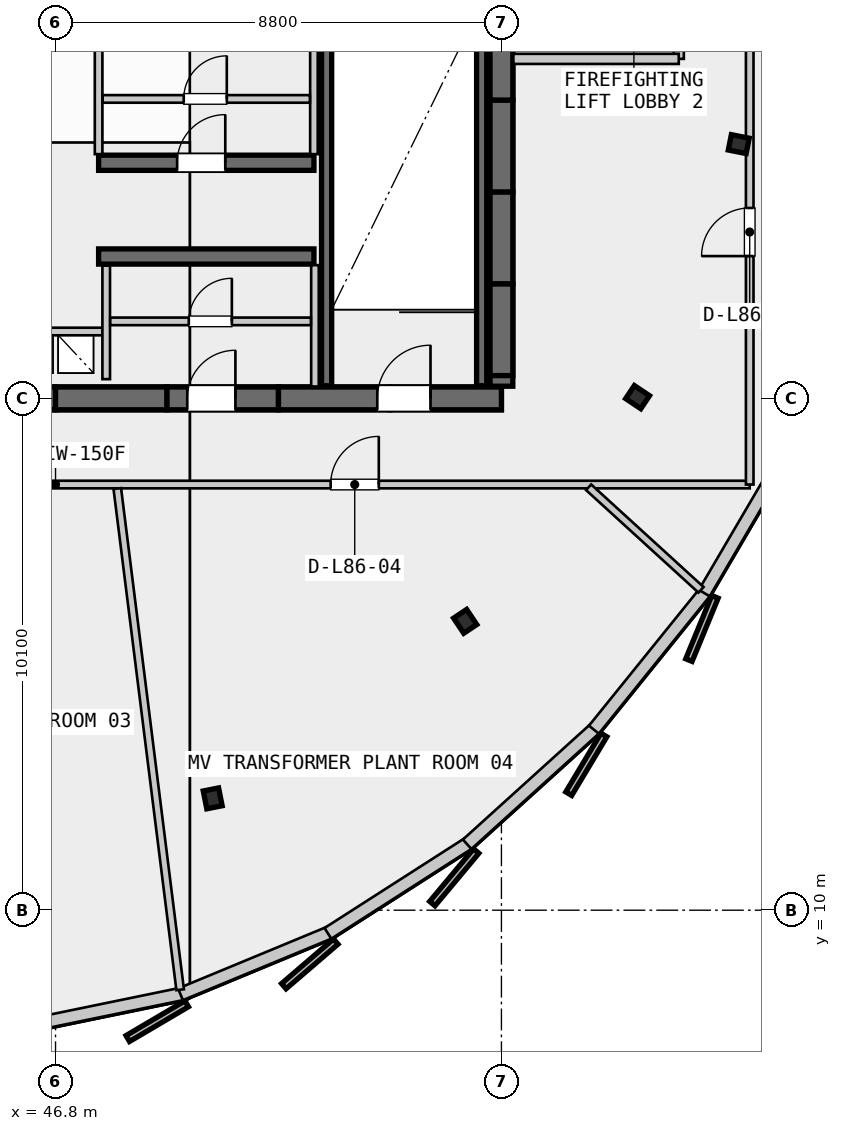
"""IFC4 building model, lengths in metres.
Left out: names, types, materials, properties, quantities, classifications, styles, units other than length and angle.
Written with IfcOpenShell. Run it as: python <this file> out.ifc"""

import sys

from ifc_helpers import new_model, si_unit, direction, frame, frame_2d, origin, origin_2d, place, context, subcontext, project, spatial, rectangle, i_section, extrude, source, transform, mapped, element, fill, save


model = new_model("IFC4")
c1 = context("Model", 3, precision=1e-05, world=origin(), true_north=direction((0.0, 1.0)))
c2 = subcontext(c1, "Body", "Model", "MODEL_VIEW")
j1 = project(units=[si_unit("LENGTHUNIT", "METRE"), si_unit("PLANEANGLEUNIT", "RADIAN")], contexts=[c1])
p1 = place(None, origin())
s1 = spatial("IfcSite", under=j1, at=p1, CompositionType="ELEMENT")
p2 = place(p1, origin())
s2 = spatial("IfcBuilding", under=s1, at=p2, CompositionType="ELEMENT")
p3 = place(p2, frame((0.0, 0.0, 324.3)))
s3 = spatial("IfcBuildingStorey", under=s2, at=p3, CompositionType="ELEMENT", Elevation=324.3)
p4 = place(p3, frame((38.0, 20.1, 0.0), z_axis=(0.0, 0.0, 1.0), x_axis=(1.0, 0.0, 0.0)))
e1 = element("IfcWall", 1, at=p4, inside=s3, PredefinedType="SHEAR", context=c2, shape_type="SweptSolid", body=[
    extrude(rectangle(XDim=17.6, YDim=0.45, at=frame_2d((8.8, 0.0))), origin(), (0.0, 0.0, 1.0), 4.2),
])
p5 = place(p4, frame((1.4, 0.0, 0.0)))
e2 = element("IfcOpeningElement", 2, at=p5, cuts=e1, PredefinedType="OPENING", context=c2, shape_type="SweptSolid", body=[
    extrude(rectangle(XDim=1.05, YDim=2.15, at=frame_2d((0.525, 1.075))), frame((0.0, 0.235, 0.0), z_axis=(0.0, -1.0, 0.0), x_axis=(1.0, 0.0, 0.0)), (0.0, 0.0, 1.0), 0.47),
])
p6 = place(p4, frame((15.15, 0.0, 0.0)))
e3 = element("IfcOpeningElement", 3, at=p6, cuts=e1, PredefinedType="OPENING", context=c2, shape_type="SweptSolid", body=[
    extrude(rectangle(XDim=1.05, YDim=2.15, at=frame_2d((0.525, 1.075))), frame((0.0, 0.235, 0.0), z_axis=(0.0, -1.0, 0.0), x_axis=(1.0, 0.0, 0.0)), (0.0, 0.0, 1.0), 0.47),
])
p7 = place(p4, frame((5.25, 0.0, 0.0)))
e4 = element("IfcOpeningElement", 4, at=p7, cuts=e1, PredefinedType="OPENING", context=c2, shape_type="SweptSolid", body=[
    extrude(rectangle(XDim=0.9, YDim=2.15, at=frame_2d((0.45, 1.075))), frame((0.0, 0.235, 0.0), z_axis=(0.0, -1.0, 0.0), x_axis=(1.0, 0.0, 0.0)), (0.0, 0.0, 1.0), 0.47),
])
p8 = place(p4, frame((11.4, 0.0, 0.0)))
e5 = element("IfcOpeningElement", 5, at=p8, cuts=e1, PredefinedType="OPENING", context=c2, shape_type="SweptSolid", body=[
    extrude(rectangle(XDim=0.95, YDim=2.15, at=frame_2d((0.475, 1.075))), frame((0.0, 0.235, 0.0), z_axis=(0.0, -1.0, 0.0), x_axis=(1.0, 0.0, 0.0)), (0.0, 0.0, 1.0), 0.47),
])
p9 = place(p3, frame((55.6, 20.34, 0.0), z_axis=(0.0, 0.0, 1.0), x_axis=(0.0, 1.0, 0.0)))
e6 = element("IfcWall", 6, at=p9, inside=s3, PredefinedType="SHEAR", context=c2, shape_type="SweptSolid", body=[
    extrude(rectangle(XDim=14.92, YDim=0.45, at=frame_2d((7.46, 0.0))), origin(), (0.0, 0.0, 1.0), 4.2),
])
p10 = place(p9, frame((12.71, 0.0, 0.0)))
e7 = element("IfcOpeningElement", 7, at=p10, cuts=e6, PredefinedType="OPENING", context=c2, shape_type="SweptSolid", body=[
    extrude(rectangle(XDim=1.05, YDim=2.15, at=frame_2d((0.525, 1.075))), frame((0.0, 0.235, 0.0), z_axis=(0.0, -1.0, 0.0), x_axis=(1.0, 0.0, 0.0)), (0.0, 0.0, 1.0), 0.47),
])
p11 = place(p9, frame((8.61, 0.0, 0.0)))
e8 = element("IfcOpeningElement", 8, at=p11, cuts=e6, PredefinedType="OPENING", context=c2, shape_type="SweptSolid", body=[
    extrude(rectangle(XDim=1.1, YDim=2.2, at=frame_2d((0.55, 1.1))), frame((0.0, 0.235, 0.0), z_axis=(0.0, -1.0, 0.0), x_axis=(1.0, 0.0, 0.0)), (0.0, 0.0, 1.0), 0.47),
])
p12 = place(p3, frame((47.65, 22.9, 0.0), z_axis=(0.0, 0.0, 1.0), x_axis=(1.0, 0.0, 0.0)))
e9 = element("IfcWall", 9, at=p12, inside=s3, PredefinedType="SHEAR", context=c2, shape_type="SweptSolid", body=[
    extrude(rectangle(XDim=4.25, YDim=0.3, at=frame_2d((2.125, 0.0))), origin(), (0.0, 0.0, 1.0), 4.2),
])
p13 = place(p3, frame((47.65, 24.75, 0.0), z_axis=(0.0, 0.0, 1.0), x_axis=(1.0, 0.0, 0.0)))
e10 = element("IfcWall", 10, at=p13, inside=s3, PredefinedType="SHEAR", context=c2, shape_type="SweptSolid", body=[
    extrude(rectangle(XDim=4.25, YDim=0.3, at=frame_2d((2.125, 0.0))), origin(), (0.0, 0.0, 1.0), 4.2),
])
p14 = place(p13, frame((1.55, 0.0, 0.0)))
e11 = element("IfcOpeningElement", 11, at=p14, cuts=e10, PredefinedType="OPENING", context=c2, shape_type="SweptSolid", body=[
    extrude(rectangle(XDim=0.95, YDim=2.15, at=frame_2d((0.475, 1.075))), frame((0.0, 0.16, 0.0), z_axis=(0.0, -1.0, 0.0), x_axis=(1.0, 0.0, 0.0)), (0.0, 0.0, 1.0), 0.32),
])
m1 = source(origin(), c2, "Body", "SweptSolid", [
    extrude(i_section(OverallWidth=0.309, OverallDepth=0.359, WebThickness=0.016, FlangeThickness=0.026, FilletRadius=0.027, at=origin_2d()), origin(), (0.0, 0.0, 1.0), 5.234),
])
p15 = place(p3, frame((49.902, 12.207, 0.0), z_axis=(0.0, 0.0, 1.0), x_axis=(0.195090322016, -0.980785280403, 0.0)))
e12 = element("IfcColumn", 12, at=p15, inside=s3, PredefinedType="COLUMN", context=c2, shape_type="MappedRepresentation", body=[
    mapped(m1, transform((0.0, 0.0, 0.0), scale=1.0)),
])
m2 = source(origin(), c2, "Body", "SweptSolid", [
    extrude(i_section(OverallWidth=0.309, OverallDepth=0.359, WebThickness=0.016, FlangeThickness=0.026, FilletRadius=0.027, at=origin_2d()), origin(), (0.0, 0.0, 1.0), 6.133),
])
p16 = place(p3, frame((54.885, 15.7, 0.0), z_axis=(0.0, 0.0, 1.0), x_axis=(0.55557023302, -0.831469612303, 0.0)))
e13 = element("IfcColumn", 13, at=p16, inside=s3, PredefinedType="COLUMN", context=c2, shape_type="MappedRepresentation", body=[
    mapped(m2, transform((0.0, 0.0, 0.0), scale=1.0)),
])
m3 = source(origin(), c2, "Body", "SweptSolid", [
    extrude(i_section(OverallWidth=0.309, OverallDepth=0.359, WebThickness=0.016, FlangeThickness=0.026, FilletRadius=0.027, at=origin_2d()), origin(), (0.0, 0.0, 1.0), 7.106),
])
p17 = place(p3, frame((58.287, 20.125, 0.0), z_axis=(0.0, 0.0, 1.0), x_axis=(0.831469612303, -0.55557023302, 0.0)))
e14 = element("IfcColumn", 14, at=p17, inside=s3, PredefinedType="COLUMN", context=c2, shape_type="MappedRepresentation", body=[
    mapped(m3, transform((0.0, 0.0, 0.0), scale=1.0)),
])
m4 = source(origin(), c2, "Body", "SweptSolid", [
    extrude(i_section(OverallWidth=0.309, OverallDepth=0.359, WebThickness=0.016, FlangeThickness=0.026, FilletRadius=0.027, at=origin_2d()), origin(), (0.0, 0.0, 1.0), 8.099),
])
p18 = place(p3, frame((60.284, 25.118, 0.0), z_axis=(0.0, 0.0, 1.0), x_axis=(0.980785280403, -0.195090322016, 0.0)))
e15 = element("IfcColumn", 15, at=p18, inside=s3, PredefinedType="COLUMN", context=c2, shape_type="MappedRepresentation", body=[
    mapped(m4, transform((0.0, 0.0, 0.0), scale=1.0)),
])
p19 = place(p3, frame((44.6, 20.1, 4.2), z_axis=(0.0, 0.0, 1.0), x_axis=(1.0, 0.0, 0.0)))
e16 = element("IfcWall", 16, at=p19, inside=s3, PredefinedType="SHEAR", context=c2, shape_type="SweptSolid", body=[
    extrude(rectangle(XDim=2.2, YDim=0.45, at=frame_2d((1.1, 0.0))), origin(), (0.0, 0.0, 1.0), 2.129),
])
p20 = place(p3, frame((46.8, 20.1, 4.2), z_axis=(0.0, 0.0, 1.0), x_axis=(1.0, 0.0, 0.0)))
e17 = element("IfcWall", 17, at=p20, inside=s3, PredefinedType="SHEAR", context=c2, shape_type="SweptSolid", body=[
    extrude(rectangle(XDim=2.2, YDim=0.45, at=frame_2d((1.1, 0.0))), origin(), (0.0, 0.0, 1.0), 2.255),
])
p21 = place(p3, frame((49.0, 20.1, 4.2), z_axis=(0.0, 0.0, 1.0), x_axis=(1.0, 0.0, 0.0)))
e18 = element("IfcWall", 18, at=p21, inside=s3, PredefinedType="SHEAR", context=c2, shape_type="SweptSolid", body=[
    extrude(rectangle(XDim=2.2, YDim=0.45, at=frame_2d((1.1, 0.0))), origin(), (0.0, 0.0, 1.0), 2.381),
])
p22 = place(p3, frame((51.2, 20.1, 4.2), z_axis=(0.0, 0.0, 1.0), x_axis=(1.0, 0.0, 0.0)))
e19 = element("IfcWall", 19, at=p22, inside=s3, PredefinedType="SHEAR", context=c2, shape_type="SweptSolid", body=[
    extrude(rectangle(XDim=2.2, YDim=0.45, at=frame_2d((1.1, 0.0))), origin(), (0.0, 0.0, 1.0), 2.507),
])
p23 = place(p3, frame((53.4, 20.1, 4.2), z_axis=(0.0, 0.0, 1.0), x_axis=(1.0, 0.0, 0.0)))
e20 = element("IfcWall", 20, at=p23, inside=s3, PredefinedType="SHEAR", context=c2, shape_type="SweptSolid", body=[
    extrude(rectangle(XDim=2.2, YDim=0.45, at=frame_2d((1.1, 0.0))), origin(), (0.0, 0.0, 1.0), 2.633),
])
p24 = place(p3, frame((55.6, 20.55, 4.2), z_axis=(0.0, 0.0, 1.0), x_axis=(0.0, 1.0, 0.0)))
e21 = element("IfcWall", 21, at=p24, inside=s3, PredefinedType="SHEAR", context=c2, shape_type="SweptSolid", body=[
    extrude(rectangle(XDim=1.812, YDim=0.45, at=frame_2d((0.906, 0.0))), origin(), (0.0, 0.0, 1.0), 2.837),
])
p25 = place(p3, frame((55.6, 22.363, 4.2), z_axis=(0.0, 0.0, 1.0), x_axis=(0.0, 1.0, 0.0)))
e22 = element("IfcWall", 22, at=p25, inside=s3, PredefinedType="SHEAR", context=c2, shape_type="SweptSolid", body=[
    extrude(rectangle(XDim=1.812, YDim=0.45, at=frame_2d((0.906, 0.0))), origin(), (0.0, 0.0, 1.0), 3.156),
])
p26 = place(p3, frame((55.6, 24.175, 4.2), z_axis=(0.0, 0.0, 1.0), x_axis=(0.0, 1.0, 0.0)))
e23 = element("IfcWall", 23, at=p26, inside=s3, PredefinedType="SHEAR", context=c2, shape_type="SweptSolid", body=[
    extrude(rectangle(XDim=1.812, YDim=0.45, at=frame_2d((0.906, 0.0))), origin(), (0.0, 0.0, 1.0), 3.475),
])
p27 = place(p3, frame((55.6, 25.988, 4.2), z_axis=(0.0, 0.0, 1.0), x_axis=(0.0, 1.0, 0.0)))
e24 = element("IfcWall", 24, at=p27, inside=s3, PredefinedType="SHEAR", context=c2, shape_type="SweptSolid", body=[
    extrude(rectangle(XDim=1.812, YDim=0.45, at=frame_2d((0.906, 0.0))), origin(), (0.0, 0.0, 1.0), 3.794),
])
p28 = place(p3, frame((46.283, 7.728, 4.226), z_axis=(0.0, 0.0, 1.0), x_axis=(0.979455196184, 0.201661891959, 0.0)))
e25 = element("IfcWall", 25, at=p28, inside=s3, PredefinedType="PARAPET", context=c2, shape_type="SweptSolid", body=[
    extrude(rectangle(XDim=3.071, YDim=0.25, at=frame_2d((1.536, 0.0))), origin(), (0.0, 0.0, 1.0), 0.16),
])
p29 = place(p3, frame((49.266, 8.34, 4.507), z_axis=(0.0, 0.0, 1.0), x_axis=(0.923860238218, 0.382730009588, 0.0)))
e26 = element("IfcWall", 26, at=p29, inside=s3, PredefinedType="PARAPET", context=c2, shape_type="SweptSolid", body=[
    extrude(rectangle(XDim=3.174, YDim=0.25, at=frame_2d((1.587, 0.0))), origin(), (0.0, 0.0, 1.0), 0.21),
])
p30 = place(p3, frame((52.176, 9.543, 4.889), z_axis=(0.0, 0.0, 1.0), x_axis=(0.841940597413, 0.539570227521, 0.0)))
e27 = element("IfcWall", 27, at=p30, inside=s3, PredefinedType="PARAPET", context=c2, shape_type="SweptSolid", body=[
    extrude(rectangle(XDim=3.285, YDim=0.25, at=frame_2d((1.643, 0.0))), origin(), (0.0, 0.0, 1.0), 0.255),
])
p31 = place(p3, frame((54.923, 11.302, 5.359), z_axis=(0.0, 0.0, 1.0), x_axis=(0.741510215503, 0.670941577415, 0.0)))
e28 = element("IfcWall", 28, at=p31, inside=s3, PredefinedType="PARAPET", context=c2, shape_type="SweptSolid", body=[
    extrude(rectangle(XDim=3.394, YDim=0.25, at=frame_2d((1.697, 0.0))), origin(), (0.0, 0.0, 1.0), 0.292),
])
p32 = place(p3, frame((57.425, 13.563, 5.903), z_axis=(0.0, 0.0, 1.0), x_axis=(0.628232778482, 0.778025434058, 0.0)))
e29 = element("IfcWall", 29, at=p32, inside=s3, PredefinedType="PARAPET", context=c2, shape_type="SweptSolid", body=[
    extrude(rectangle(XDim=3.486, YDim=0.25, at=frame_2d((1.743, 0.0))), origin(), (0.0, 0.0, 1.0), 0.321),
])
p33 = place(p3, frame((59.603, 16.258, 6.506), z_axis=(0.0, 0.0, 1.0), x_axis=(0.505932830003, 0.862572878964, 0.0)))
e30 = element("IfcWall", 30, at=p33, inside=s3, PredefinedType="PARAPET", context=c2, shape_type="SweptSolid", body=[
    extrude(rectangle(XDim=3.553, YDim=0.25, at=frame_2d((1.777, 0.0))), origin(), (0.0, 0.0, 1.0), 0.341),
])
for number, where, z_axis, x_axis in (
    (31, (55.21, 27.7, 0.0), (0.0, 0.0, 1.0), (0.0, -1.0, 0.0)),
    (32, (52.15, 20.35, 0.0), (0.0, 0.0, 1.0), (0.0, 1.0, 0.0)),
):
    element("IfcWall", number, at=place(p3, frame(where, z_axis=z_axis, x_axis=x_axis)), inside=s3, PredefinedType="SHEAR", context=c2, shape_type="SweptSolid", body=[
        extrude(rectangle(XDim=7.35, YDim=0.2, at=frame_2d((3.675, 0.0))), origin(), (0.0, 0.0, 1.0), 4.2),
    ])
p34 = place(p3, frame((45.8, 21.42, 0.0), z_axis=(0.0, 0.0, 1.0), x_axis=(1.0, 0.0, 0.0)))
e33 = element("IfcWall", 33, at=p34, inside=s3, PredefinedType="PARTITIONING", context=c2, shape_type="SweptSolid", body=[
    extrude(rectangle(XDim=2.0, YDim=0.15, at=frame_2d((1.0, 0.0))), origin(), (0.0, 0.0, 1.0), 3.49),
])
p35 = place(p3, frame((47.8, 20.48, 0.0), z_axis=(0.0, 0.0, 1.0), x_axis=(0.0, 1.0, 0.0)))
e34 = element("IfcWall", 34, at=p35, inside=s3, PredefinedType="PARTITIONING", context=c2, shape_type="SweptSolid", body=[
    extrude(rectangle(XDim=2.24, YDim=0.15, at=frame_2d((1.12, 0.0))), origin(), (0.0, 0.0, 1.0), 3.49),
])
p36 = place(p3, frame((59.1, 26.8, 0.0), z_axis=(0.0, 0.0, 1.0), x_axis=(0.0, 1.0, 0.0)))
e35 = element("IfcWall", 35, at=p36, inside=s3, PredefinedType="PARTITIONING", context=c2, shape_type="SweptSolid", body=[
    extrude(rectangle(XDim=4.4, YDim=0.2, at=frame_2d((2.2, 0.0))), origin(), (0.0, 0.0, 1.0), 3.49),
])
p37 = place(p36, frame((1.65, 0.0, 0.0)))
e36 = element("IfcOpeningElement", 36, at=p37, cuts=e35, PredefinedType="OPENING", context=c2, shape_type="SweptSolid", body=[
    extrude(rectangle(XDim=1.05, YDim=2.15, at=frame_2d((0.525, 1.075))), frame((0.0, 0.11, 0.0), z_axis=(0.0, -1.0, 0.0), x_axis=(1.0, 0.0, 0.0)), (0.0, 0.0, 1.0), 0.22),
])
p38 = place(p3, frame((55.835, 26.8, 0.0), z_axis=(0.0, 0.0, 1.0), x_axis=(1.0, 0.0, 0.0)))
e37 = element("IfcWall", 37, at=p38, inside=s3, PredefinedType="PARTITIONING", context=c2, shape_type="SweptSolid", body=[
    extrude(rectangle(XDim=3.265, YDim=0.2, at=frame_2d((1.633, 0.0))), origin(), (0.0, 0.0, 1.0), 3.49),
])
p39 = place(p3, frame((51.92, 20.335, 0.0), z_axis=(0.0, 0.0, 1.0), x_axis=(0.0, 1.0, 0.0)))
e38 = element("IfcWall", 38, at=p39, inside=s3, PredefinedType="PARTITIONING", context=c2, shape_type="SweptSolid", body=[
    extrude(rectangle(XDim=2.395, YDim=0.15, at=frame_2d((1.198, 0.0))), origin(), (0.0, 0.0, 1.0), 3.49),
])
p40 = place(p3, frame((47.88, 21.62, 0.0), z_axis=(0.0, 0.0, 1.0), x_axis=(1.0, 0.0, 0.0)))
e39 = element("IfcWall", 39, at=p40, inside=s3, PredefinedType="PARTITIONING", context=c2, shape_type="SweptSolid", body=[
    extrude(rectangle(XDim=3.96, YDim=0.15, at=frame_2d((1.98, 0.0))), origin(), (0.0, 0.0, 1.0), 2.76),
])
p41 = place(p40, frame((1.55, 0.0, 0.0)))
e40 = element("IfcOpeningElement", 40, at=p41, cuts=e39, PredefinedType="OPENING", context=c2, shape_type="SweptSolid", body=[
    extrude(rectangle(XDim=0.85, YDim=2.15, at=frame_2d((0.425, 1.075))), frame((0.0, 0.085, 0.0), z_axis=(0.0, -1.0, 0.0), x_axis=(1.0, 0.0, 0.0)), (0.0, 0.0, 1.0), 0.17),
])
for number, where, z_axis, x_axis in (
    (41, (47.65, 24.92, 0.0), (0.0, 0.0, 1.0), (0.0, 1.0, 0.0)),
    (42, (51.9, 24.92, 0.0), (0.0, 0.0, 1.0), (0.0, 1.0, 0.0)),
):
    element("IfcWall", number, at=place(p3, frame(where, z_axis=z_axis, x_axis=x_axis)), inside=s3, PredefinedType="PARTITIONING", context=c2, shape_type="SweptSolid", body=[
        extrude(rectangle(XDim=2.24, YDim=0.15, at=frame_2d((1.12, 0.0))), origin(), (0.0, 0.0, 1.0), 2.76),
    ])
p42 = place(p3, frame((47.73, 26.01, 0.0), z_axis=(0.0, 0.0, 1.0), x_axis=(1.0, 0.0, 0.0)))
e43 = element("IfcWall", 43, at=p42, inside=s3, PredefinedType="PARTITIONING", context=c2, shape_type="SweptSolid", body=[
    extrude(rectangle(XDim=4.09, YDim=0.15, at=frame_2d((2.045, 0.0))), origin(), (0.0, 0.0, 1.0), 2.76),
])
p43 = place(p42, frame((1.6, 0.0, 0.0)))
e44 = element("IfcOpeningElement", 44, at=p43, cuts=e43, PredefinedType="OPENING", context=c2, shape_type="SweptSolid", body=[
    extrude(rectangle(XDim=0.85, YDim=2.15, at=frame_2d((0.425, 1.075))), frame((0.0, 0.085, 0.0), z_axis=(0.0, -1.0, 0.0), x_axis=(1.0, 0.0, 0.0)), (0.0, 0.0, 1.0), 0.17),
])
p44 = place(p3, frame((33.1, 18.4, 0.0), z_axis=(0.0, 0.0, 1.0), x_axis=(1.0, 0.0, 0.0)))
e45 = element("IfcWall", 45, at=p44, inside=s3, PredefinedType="PARTITIONING", context=c2, shape_type="SweptSolid", body=[
    extrude(rectangle(XDim=27.4, YDim=0.15, at=frame_2d((13.7, 0.0))), origin(), (0.0, 0.0, 1.0), 3.49),
])
p45 = place(p44, frame((4.35, 0.0, 0.0)))
e46 = element("IfcOpeningElement", 46, at=p45, cuts=e45, PredefinedType="OPENING", context=c2, shape_type="SweptSolid", body=[
    extrude(rectangle(XDim=0.95, YDim=2.15, at=frame_2d((0.475, 1.075))), frame((0.0, 0.085, 0.0), z_axis=(0.0, -1.0, 0.0), x_axis=(1.0, 0.0, 0.0)), (0.0, 0.0, 1.0), 0.17),
])
p46 = place(p44, frame((11.499, 0.0, 0.0)))
e47 = element("IfcOpeningElement", 47, at=p46, cuts=e45, PredefinedType="OPENING", context=c2, shape_type="SweptSolid", body=[
    extrude(rectangle(XDim=0.95, YDim=2.15, at=frame_2d((0.475, 1.075))), frame((0.0, 0.085, 0.0), z_axis=(0.0, -1.0, 0.0), x_axis=(1.0, 0.0, 0.0)), (0.0, 0.0, 1.0), 0.17),
])
p47 = place(p44, frame((19.13, 0.0, 0.0)))
e48 = element("IfcOpeningElement", 48, at=p47, cuts=e45, PredefinedType="OPENING", context=c2, shape_type="SweptSolid", body=[
    extrude(rectangle(XDim=0.95, YDim=2.15, at=frame_2d((0.475, 1.075))), frame((0.0, 0.085, 0.0), z_axis=(0.0, -1.0, 0.0), x_axis=(1.0, 0.0, 0.0)), (0.0, 0.0, 1.0), 0.17),
])
p48 = place(p3, frame((60.5, 18.4, 0.0), z_axis=(0.0, 0.0, 1.0), x_axis=(0.0, 1.0, 0.0)))
e49 = element("IfcWall", 49, at=p48, inside=s3, PredefinedType="PARTITIONING", context=c2, shape_type="SweptSolid", body=[
    extrude(rectangle(XDim=18.8, YDim=0.15, at=frame_2d((9.4, 0.0))), origin(), (0.0, 0.0, 1.0), 3.49),
])
p49 = place(p48, frame((4.508, 0.0, 0.0)))
e50 = element("IfcOpeningElement", 50, at=p49, cuts=e49, PredefinedType="OPENING", context=c2, shape_type="SweptSolid", body=[
    extrude(rectangle(XDim=0.95, YDim=2.15, at=frame_2d((0.475, 1.075))), frame((0.0, 0.085, 0.0), z_axis=(0.0, -1.0, 0.0), x_axis=(1.0, 0.0, 0.0)), (0.0, 0.0, 1.0), 0.17),
])
p50 = place(p48, frame((13.673, 0.0, 0.0)))
e51 = element("IfcOpeningElement", 51, at=p50, cuts=e49, PredefinedType="OPENING", context=c2, shape_type="SweptSolid", body=[
    extrude(rectangle(XDim=0.95, YDim=2.15, at=frame_2d((0.475, 1.075))), frame((0.0, 0.085, 0.0), z_axis=(0.0, -1.0, 0.0), x_axis=(1.0, 0.0, 0.0)), (0.0, 0.0, 1.0), 0.17),
])
p51 = place(p3, frame((48.019, 18.321, 0.0), z_axis=(0.0, 0.0, 1.0), x_axis=(0.124498961455, -0.99221973806, 0.0)))
e52 = element("IfcWall", 52, at=p51, inside=s3, PredefinedType="PARTITIONING", context=c2, shape_type="SweptSolid", body=[
    extrude(rectangle(XDim=9.968, YDim=0.15, at=frame_2d((4.984, 0.0))), origin(), (0.0, 0.0, 1.0), 3.49),
])
p52 = place(p3, frame((57.321, 18.346, 0.0), z_axis=(0.0, 0.0, 1.0), x_axis=(0.738761763857, -0.673966658124, 0.0)))
e53 = element("IfcWall", 53, at=p52, inside=s3, PredefinedType="PARTITIONING", context=c2, shape_type="SweptSolid", body=[
    extrude(rectangle(XDim=3.003, YDim=0.15, at=frame_2d((1.501, 0.0))), origin(), (0.0, 0.0, 1.0), 3.49),
])
m5 = source(origin(), c2, "Body", "SweptSolid", [
    extrude(rectangle(XDim=1.05, YDim=2.15, at=frame_2d((0.525, 1.075))), frame((0.0, 0.025, 0.0), z_axis=(0.0, -1.0, 0.0), x_axis=(1.0, 0.0, 0.0)), (0.0, 0.0, 1.0), 0.05),
])
p53 = place(p6, origin())
e54 = element("IfcDoor", 54, at=p53, inside=s3, OperationType="SINGLE_SWING_RIGHT", PredefinedType="DOOR", context=c2, shape_type="MappedRepresentation", body=[
    mapped(m5, transform((0.0, 0.0, 0.0), scale=1.0)),
])
fill(e3, e54)
m6 = source(origin(), c2, "Body", "SweptSolid", [
    extrude(rectangle(XDim=0.95, YDim=2.15, at=frame_2d((0.475, 1.075))), frame((0.0, 0.025, 0.0), z_axis=(0.0, -1.0, 0.0), x_axis=(1.0, 0.0, 0.0)), (0.0, 0.0, 1.0), 0.05),
])
p54 = place(p8, origin())
e55 = element("IfcDoor", 55, at=p54, inside=s3, OperationType="SINGLE_SWING_RIGHT", PredefinedType="DOOR", context=c2, shape_type="MappedRepresentation", body=[
    mapped(m6, transform((0.0, 0.0, 0.0), scale=1.0)),
])
fill(e5, e55)
p55 = place(p14, origin())
e56 = element("IfcDoor", 56, at=p55, inside=s3, OperationType="SINGLE_SWING_RIGHT", PredefinedType="DOOR", context=c2, shape_type="MappedRepresentation", body=[
    mapped(m6, transform((0.0, 0.0, 0.0), scale=1.0)),
])
fill(e11, e56)
m7 = source(origin(), c2, "Body", "SweptSolid", [
    extrude(rectangle(XDim=0.85, YDim=2.15, at=frame_2d((0.425, 1.075))), frame((0.0, 0.025, 0.0), z_axis=(0.0, -1.0, 0.0), x_axis=(1.0, 0.0, 0.0)), (0.0, 0.0, 1.0), 0.05),
])
p56 = place(p41, origin())
e57 = element("IfcDoor", 57, at=p56, inside=s3, OperationType="SINGLE_SWING_RIGHT", PredefinedType="DOOR", context=c2, shape_type="MappedRepresentation", body=[
    mapped(m7, transform((0.0, 0.0, 0.0), scale=1.0)),
])
fill(e40, e57)
p57 = place(p43, origin())
e58 = element("IfcDoor", 58, at=p57, inside=s3, OperationType="SINGLE_SWING_RIGHT", PredefinedType="DOOR", context=c2, shape_type="MappedRepresentation", body=[
    mapped(m7, transform((0.0, 0.0, 0.0), scale=1.0)),
])
fill(e44, e58)
p58 = place(p47, origin())
e59 = element("IfcDoor", 59, at=p58, inside=s3, OperationType="SINGLE_SWING_RIGHT", PredefinedType="DOOR", context=c2, shape_type="MappedRepresentation", body=[
    mapped(m6, transform((0.0, 0.0, 0.0), scale=1.0)),
])
fill(e48, e59)
p59 = place(p49, origin())
e60 = element("IfcDoor", 60, at=p59, inside=s3, OperationType="SINGLE_SWING_LEFT", PredefinedType="DOOR", context=c2, shape_type="MappedRepresentation", body=[
    mapped(m6, transform((0.0, 0.0, 0.0), scale=1.0)),
])
fill(e50, e60)
save(model, sys.argv[1])
